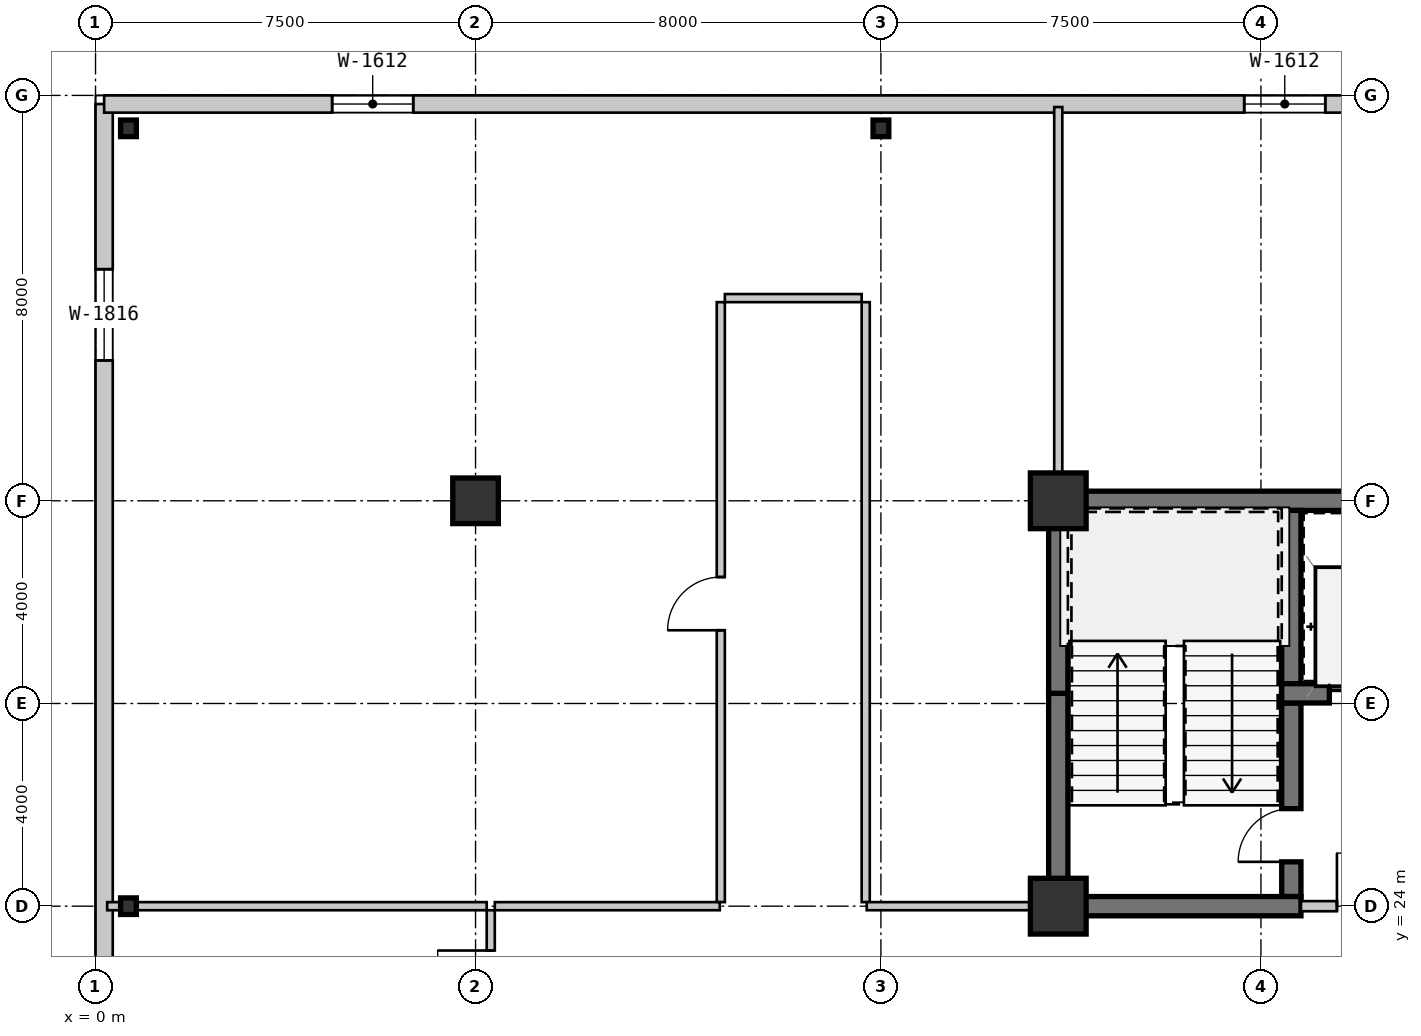
"""IFC4 building model, lengths in metres.
Left out: names, types, materials, properties, quantities, classifications, styles, units other than length and angle.
Written with IfcOpenShell. Run it as: python <this file> out.ifc"""

import sys

from ifc_helpers import new_model, si_unit, direction, frame, frame_2d, origin, origin_2d, place, context, subcontext, project, spatial, rectangle, circle, i_section, extrude, source, transform, mapped, element, fill, save


model = new_model("IFC4")
c1 = context("Model", 3, precision=1e-05, world=origin(), true_north=direction((0.0, 1.0)))
c2 = subcontext(c1, "Body", "Model", "MODEL_VIEW")
j1 = project(units=[si_unit("LENGTHUNIT", "METRE"), si_unit("PLANEANGLEUNIT", "RADIAN")], contexts=[c1])
p1 = place(None, origin())
s1 = spatial("IfcSite", under=j1, at=p1, CompositionType="ELEMENT")
p2 = place(p1, origin())
s2 = spatial("IfcBuilding", under=s1, at=p2, CompositionType="ELEMENT")
p3 = place(p2, frame((0.0, 0.0, 12.95)))
s3 = spatial("IfcBuildingStorey", under=s2, at=p3, CompositionType="ELEMENT", Elevation=12.95)
m1 = source(origin(), c2, "Body", "SweptSolid", [
    extrude(rectangle(XDim=1.1, YDim=1.1, at=origin_2d()), origin(), (0.0, 0.0, 1.0), 3.85),
])
for number, where, z_axis, x_axis in (
    (1, (19.0, 24.0, 0.0), (0.0, 0.0, 1.0), (1.0, 0.0, 0.0)),
    (2, (19.0, 32.0, 0.0), (0.0, 0.0, 1.0), (1.0, 0.0, 0.0)),
):
    element("IfcColumn", number, at=place(p3, frame(where, z_axis=z_axis, x_axis=x_axis)), inside=s3, PredefinedType="COLUMN", context=c2, shape_type="MappedRepresentation", body=[
        mapped(m1, transform((0.0, 0.0, 0.0), scale=1.0)),
    ])
m2 = source(origin(), c2, "Body", "SweptSolid", [
    extrude(circle(Radius=0.45, at=origin_2d()), origin(), (0.0, 0.0, 1.0), 3.85),
])
p4 = place(p3, frame((7.5, 32.0, 0.0), z_axis=(0.0, 0.0, 1.0), x_axis=(1.0, 0.0, 0.0)))
e3 = element("IfcColumn", 3, at=p4, inside=s3, PredefinedType="COLUMN", context=c2, shape_type="MappedRepresentation", body=[
    mapped(m2, transform((0.0, 0.0, 0.0), scale=1.0)),
])
m3 = source(origin(), c2, "Body", "SweptSolid", [
    extrude(i_section(OverallWidth=0.311, OverallDepth=0.327, WebThickness=0.016, FlangeThickness=0.025, at=origin_2d()), origin(), (0.0, 0.0, 1.0), 3.85),
])
for number, where, z_axis, x_axis in (
    (4, (0.65, 24.0, 0.0), (0.0, 0.0, 1.0), (1.0, 0.0, 0.0)),
    (5, (0.65, 39.35, 0.0), (0.0, 0.0, 1.0), (1.0, 0.0, 0.0)),
    (6, (15.5, 39.35, 0.0), (0.0, 0.0, 1.0), (1.0, 0.0, 0.0)),
):
    element("IfcColumn", number, at=place(p3, frame(where, z_axis=z_axis, x_axis=x_axis)), inside=s3, PredefinedType="COLUMN", context=c2, shape_type="MappedRepresentation", body=[
        mapped(m3, transform((0.0, 0.0, 0.0), scale=1.0)),
    ])
m4 = source(origin(), c2, "Body", "SweptSolid", [
    extrude(rectangle(XDim=39.66, YDim=0.34, at=frame_2d((19.83, 0.0))), origin(), (0.0, 0.0, 1.0), 3.43),
])
p5 = place(p3, frame((0.17, 0.17, 0.0), z_axis=(0.0, 0.0, 1.0), x_axis=(0.0, 1.0, 0.0)))
e7 = element("IfcWall", 7, at=p5, inside=s3, PredefinedType="SOLIDWALL", context=c2, shape_type="MappedRepresentation", body=[
    mapped(m4, transform((0.0, 0.0, 0.0), scale=1.0)),
])
m5 = source(origin(), c2, "Body", "SweptSolid", [
    extrude(rectangle(XDim=1.5, YDim=1.5, at=frame_2d((0.75, 0.75))), frame((0.0, 0.18, 0.0), z_axis=(0.0, -1.0, 0.0), x_axis=(1.0, 0.0, 0.0)), (0.0, 0.0, 1.0), 0.36),
])
p6 = place(p5, frame((3.2, 0.0, 0.55)))
e8 = element("IfcOpeningElement", 8, at=p6, cuts=e7, PredefinedType="OPENING", context=c2, shape_type="MappedRepresentation", body=[
    mapped(m5, transform((0.0, 0.0, 0.0), scale=1.0)),
])
m6 = source(origin(), c2, "Body", "SweptSolid", [
    extrude(rectangle(XDim=1.2, YDim=1.5, at=frame_2d((0.6, 0.75))), frame((0.0, 0.18, 0.0), z_axis=(0.0, -1.0, 0.0), x_axis=(1.0, 0.0, 0.0)), (0.0, 0.0, 1.0), 0.36),
])
p7 = place(p5, frame((7.8, 0.0, 0.55)))
e9 = element("IfcOpeningElement", 9, at=p7, cuts=e7, PredefinedType="OPENING", context=c2, shape_type="MappedRepresentation", body=[
    mapped(m6, transform((0.0, 0.0, 0.0), scale=1.0)),
])
m7 = source(origin(), c2, "Body", "SweptSolid", [
    extrude(rectangle(XDim=2.4, YDim=1.8, at=frame_2d((1.2, 0.9))), frame((0.0, 0.18, 0.0), z_axis=(0.0, -1.0, 0.0), x_axis=(1.0, 0.0, 0.0)), (0.0, 0.0, 1.0), 0.36),
])
p8 = place(p5, frame((19.8, 0.0, 0.55)))
e10 = element("IfcOpeningElement", 10, at=p8, cuts=e7, PredefinedType="OPENING", context=c2, shape_type="MappedRepresentation", body=[
    mapped(m7, transform((0.0, 0.0, 0.0), scale=1.0)),
])
m8 = source(origin(), c2, "Body", "SweptSolid", [
    extrude(rectangle(XDim=1.8, YDim=1.6, at=frame_2d((0.9, 0.8))), frame((0.0, 0.18, 0.0), z_axis=(0.0, -1.0, 0.0), x_axis=(1.0, 0.0, 0.0)), (0.0, 0.0, 1.0), 0.36),
])
p9 = place(p5, frame((34.6, 0.0, 0.55)))
e11 = element("IfcOpeningElement", 11, at=p9, cuts=e7, PredefinedType="OPENING", context=c2, shape_type="MappedRepresentation", body=[
    mapped(m8, transform((0.0, 0.0, 0.0), scale=1.0)),
])
m9 = source(origin(), c2, "Body", "SweptSolid", [
    extrude(rectangle(XDim=69.66, YDim=0.34, at=frame_2d((34.83, 0.0))), origin(), (0.0, 0.0, 1.0), 3.43),
])
p10 = place(p3, frame((0.17, 39.83, 0.0), z_axis=(0.0, 0.0, 1.0), x_axis=(1.0, 0.0, 0.0)))
e12 = element("IfcWall", 12, at=p10, inside=s3, PredefinedType="SOLIDWALL", context=c2, shape_type="MappedRepresentation", body=[
    mapped(m9, transform((0.0, 0.0, 0.0), scale=1.0)),
])
m10 = source(origin(), c2, "Body", "SweptSolid", [
    extrude(rectangle(XDim=1.6, YDim=1.2, at=frame_2d((0.8, 0.6))), frame((0.0, 0.18, 0.0), z_axis=(0.0, -1.0, 0.0), x_axis=(1.0, 0.0, 0.0)), (0.0, 0.0, 1.0), 0.36),
])
p11 = place(p10, frame((4.5, 0.0, 0.55)))
e13 = element("IfcOpeningElement", 13, at=p11, cuts=e12, PredefinedType="OPENING", context=c2, shape_type="MappedRepresentation", body=[
    mapped(m10, transform((0.0, 0.0, 0.0), scale=1.0)),
])
p12 = place(p10, frame((22.5, 0.0, 0.55)))
e14 = element("IfcOpeningElement", 14, at=p12, cuts=e12, PredefinedType="OPENING", context=c2, shape_type="MappedRepresentation", body=[
    mapped(m10, transform((0.0, 0.0, 0.0), scale=1.0)),
])
p13 = place(p10, frame((29.0, 0.0, 0.55)))
e15 = element("IfcOpeningElement", 15, at=p13, cuts=e12, PredefinedType="OPENING", context=c2, shape_type="MappedRepresentation", body=[
    mapped(m10, transform((0.0, 0.0, 0.0), scale=1.0)),
])
p14 = place(p10, frame((40.5, 0.0, 0.55)))
e16 = element("IfcOpeningElement", 16, at=p14, cuts=e12, PredefinedType="OPENING", context=c2, shape_type="MappedRepresentation", body=[
    mapped(m10, transform((0.0, 0.0, 0.0), scale=1.0)),
])
p15 = place(p10, frame((46.5, 0.0, 0.55)))
e17 = element("IfcOpeningElement", 17, at=p15, cuts=e12, PredefinedType="OPENING", context=c2, shape_type="MappedRepresentation", body=[
    mapped(m10, transform((0.0, 0.0, 0.0), scale=1.0)),
])
p16 = place(p10, frame((62.5, 0.0, 0.55)))
e18 = element("IfcOpeningElement", 18, at=p16, cuts=e12, PredefinedType="OPENING", context=c2, shape_type="MappedRepresentation", body=[
    mapped(m10, transform((0.0, 0.0, 0.0), scale=1.0)),
])
m11 = source(origin(), c2, "Body", "SweptSolid", [
    extrude(rectangle(XDim=9.19, YDim=0.38, at=frame_2d((4.595, 0.0))), origin(), (0.0, 0.0, 1.0), 3.43),
])
p17 = place(p3, frame((18.81, 32.0, 0.0), z_axis=(0.0, 0.0, 1.0), x_axis=(1.0, 0.0, 0.0)))
e19 = element("IfcWall", 19, at=p17, inside=s3, PredefinedType="SHEAR", context=c2, shape_type="MappedRepresentation", body=[
    mapped(m11, transform((0.0, 0.0, 0.0), scale=1.0)),
])
m12 = source(origin(), c2, "Body", "SweptSolid", [
    extrude(rectangle(XDim=4.01, YDim=0.38, at=frame_2d((2.005, 0.0))), origin(), (0.0, 0.0, 1.0), 3.43),
])
p18 = place(p3, frame((19.0, 24.19, 0.0), z_axis=(0.0, 0.0, 1.0), x_axis=(0.0, 1.0, 0.0)))
e20 = element("IfcWall", 20, at=p18, inside=s3, PredefinedType="SHEAR", context=c2, shape_type="MappedRepresentation", body=[
    mapped(m12, transform((0.0, 0.0, 0.0), scale=1.0)),
])
m13 = source(origin(), c2, "Body", "SweptSolid", [
    extrude(rectangle(XDim=3.61, YDim=0.38, at=frame_2d((1.805, 0.0))), origin(), (0.0, 0.0, 1.0), 3.43),
])
p19 = place(p3, frame((19.0, 28.2, 0.0), z_axis=(0.0, 0.0, 1.0), x_axis=(0.0, 1.0, 0.0)))
e21 = element("IfcWall", 21, at=p19, inside=s3, PredefinedType="SHEAR", context=c2, shape_type="MappedRepresentation", body=[
    mapped(m13, transform((0.0, 0.0, 0.0), scale=1.0)),
])
m14 = source(origin(), c2, "Body", "SweptSolid", [
    extrude(rectangle(XDim=3.42, YDim=0.38, at=frame_2d((1.71, 0.0))), origin(), (0.0, 0.0, 1.0), 3.43),
])
p20 = place(p3, frame((23.6, 28.39, 0.0), z_axis=(0.0, 0.0, 1.0), x_axis=(0.0, 1.0, 0.0)))
e22 = element("IfcWall", 22, at=p20, inside=s3, PredefinedType="SHEAR", context=c2, shape_type="MappedRepresentation", body=[
    mapped(m14, transform((0.0, 0.0, 0.0), scale=1.0)),
])
m15 = source(origin(), c2, "Body", "SweptSolid", [
    extrude(rectangle(XDim=3.82, YDim=0.38, at=frame_2d((1.91, 0.0))), origin(), (0.0, 0.0, 1.0), 3.43),
])
p21 = place(p3, frame((23.6, 24.19, 0.0), z_axis=(0.0, 0.0, 1.0), x_axis=(0.0, 1.0, 0.0)))
e23 = element("IfcWall", 23, at=p21, inside=s3, PredefinedType="SHEAR", context=c2, shape_type="MappedRepresentation", body=[
    mapped(m15, transform((0.0, 0.0, 0.0), scale=1.0)),
])
m16 = source(origin(), c2, "Body", "SweptSolid", [
    extrude(rectangle(XDim=1.05, YDim=2.1, at=frame_2d((0.525, 1.05))), frame((0.0, 0.2, 0.0), z_axis=(0.0, -1.0, 0.0), x_axis=(1.0, 0.0, 0.0)), (0.0, 0.0, 1.0), 0.4),
])
p22 = place(p21, frame((0.685, 0.0, 0.0)))
e24 = element("IfcOpeningElement", 24, at=p22, cuts=e23, PredefinedType="OPENING", context=c2, shape_type="MappedRepresentation", body=[
    mapped(m16, transform((0.0, 0.0, 0.0), scale=1.0)),
])
m17 = source(origin(), c2, "Body", "SweptSolid", [
    extrude(rectangle(XDim=4.98, YDim=0.38, at=frame_2d((2.49, 0.0))), origin(), (0.0, 0.0, 1.0), 3.43),
])
p23 = place(p3, frame((18.81, 24.0, 0.0), z_axis=(0.0, 0.0, 1.0), x_axis=(1.0, 0.0, 0.0)))
e25 = element("IfcWall", 25, at=p23, inside=s3, PredefinedType="SHEAR", context=c2, shape_type="MappedRepresentation", body=[
    mapped(m17, transform((0.0, 0.0, 0.0), scale=1.0)),
])
m18 = source(origin(), c2, "Body", "SweptSolid", [
    extrude(rectangle(XDim=2.98, YDim=0.38, at=frame_2d((1.49, 0.0))), origin(), (0.0, 0.0, 1.0), 3.43),
])
p24 = place(p3, frame((23.41, 28.2, 0.0), z_axis=(0.0, 0.0, 1.0), x_axis=(1.0, 0.0, 0.0)))
e26 = element("IfcWall", 26, at=p24, inside=s3, PredefinedType="SHEAR", context=c2, shape_type="MappedRepresentation", body=[
    mapped(m18, transform((0.0, 0.0, 0.0), scale=1.0)),
])
m19 = source(origin(), c2, "Body", "SweptSolid", [
    extrude(rectangle(XDim=1.1, YDim=2.15, at=frame_2d((0.55, 1.075))), frame((0.0, 0.2, 0.0), z_axis=(0.0, -1.0, 0.0), x_axis=(1.0, 0.0, 0.0)), (0.0, 0.0, 1.0), 0.4),
])
p25 = place(p24, frame((0.94, 0.0, 0.0)))
e27 = element("IfcOpeningElement", 27, at=p25, cuts=e26, PredefinedType="OPENING", context=c2, shape_type="MappedRepresentation", body=[
    mapped(m19, transform((0.0, 0.0, 0.0), scale=1.0)),
])
m20 = source(origin(), c2, "Body", "SweptSolid", [
    extrude(rectangle(XDim=2.66, YDim=0.2, at=frame_2d((1.33, 0.0))), origin(), (0.0, 0.0, 1.0), 2.97),
])
p26 = place(p3, frame((23.79, 24.0, 0.0), z_axis=(0.0, 0.0, 1.0), x_axis=(1.0, 0.0, 0.0)))
e28 = element("IfcWall", 28, at=p26, inside=s3, PredefinedType="SOLIDWALL", context=c2, shape_type="MappedRepresentation", body=[
    mapped(m20, transform((0.0, 0.0, 0.0), scale=1.0)),
])
m21 = source(origin(), c2, "Body", "SweptSolid", [
    extrude(rectangle(XDim=1.05, YDim=2.1, at=frame_2d((0.525, 1.05))), frame((0.0, 0.11, 0.0), z_axis=(0.0, -1.0, 0.0), x_axis=(1.0, 0.0, 0.0)), (0.0, 0.0, 1.0), 0.22),
])
p27 = place(p26, frame((0.71, 0.0, 0.0)))
e29 = element("IfcOpeningElement", 29, at=p27, cuts=e28, PredefinedType="OPENING", context=c2, shape_type="MappedRepresentation", body=[
    mapped(m21, transform((0.0, 0.0, 0.0), scale=1.0)),
])
m22 = source(origin(), c2, "Body", "SweptSolid", [
    extrude(rectangle(XDim=2.64, YDim=0.16, at=frame_2d((1.32, 0.0))), origin(), (0.0, 0.0, 1.0), 3.43),
])
p28 = place(p3, frame((7.8, 21.28, 0.0), z_axis=(0.0, 0.0, 1.0), x_axis=(0.0, 1.0, 0.0)))
e30 = element("IfcWall", 30, at=p28, inside=s3, PredefinedType="PARTITIONING", context=c2, shape_type="MappedRepresentation", body=[
    mapped(m22, transform((0.0, 0.0, 0.0), scale=1.0)),
])
m23 = source(origin(), c2, "Body", "SweptSolid", [
    extrude(rectangle(XDim=1.05, YDim=2.1, at=frame_2d((0.525, 1.05))), frame((0.0, 0.09, 0.0), z_axis=(0.0, -1.0, 0.0), x_axis=(1.0, 0.0, 0.0)), (0.0, 0.0, 1.0), 0.18),
])
p29 = place(p28, frame((0.795, 0.0, 0.0)))
e31 = element("IfcOpeningElement", 31, at=p29, cuts=e30, PredefinedType="OPENING", context=c2, shape_type="MappedRepresentation", body=[
    mapped(m23, transform((0.0, 0.0, 0.0), scale=1.0)),
])
m24 = source(origin(), c2, "Body", "SweptSolid", [
    extrude(rectangle(XDim=11.84, YDim=0.16, at=frame_2d((5.92, 0.0))), origin(), (0.0, 0.0, 1.0), 3.43),
])
p30 = place(p3, frame((12.34, 24.08, 0.0), z_axis=(0.0, 0.0, 1.0), x_axis=(0.0, 1.0, 0.0)))
e32 = element("IfcWall", 32, at=p30, inside=s3, PredefinedType="PARTITIONING", context=c2, shape_type="MappedRepresentation", body=[
    mapped(m24, transform((0.0, 0.0, 0.0), scale=1.0)),
])
p31 = place(p30, frame((5.365, 0.0, 0.0)))
e33 = element("IfcOpeningElement", 33, at=p31, cuts=e32, PredefinedType="OPENING", context=c2, shape_type="MappedRepresentation", body=[
    mapped(m23, transform((0.0, 0.0, 0.0), scale=1.0)),
])
p32 = place(p3, frame((15.2, 35.92, 0.0), z_axis=(0.0, 0.0, 1.0), x_axis=(0.0, -1.0, 0.0)))
e34 = element("IfcWall", 34, at=p32, inside=s3, PredefinedType="PARTITIONING", context=c2, shape_type="MappedRepresentation", body=[
    mapped(m24, transform((0.0, 0.0, 0.0), scale=1.0)),
])
m25 = source(origin(), c2, "Body", "SweptSolid", [
    extrude(rectangle(XDim=4.44, YDim=0.16, at=frame_2d((2.22, 0.0))), origin(), (0.0, 0.0, 1.0), 3.43),
])
p33 = place(p3, frame((7.88, 24.0, 0.0), z_axis=(0.0, 0.0, 1.0), x_axis=(1.0, 0.0, 0.0)))
e35 = element("IfcWall", 35, at=p33, inside=s3, PredefinedType="PARTITIONING", context=c2, shape_type="MappedRepresentation", body=[
    mapped(m25, transform((0.0, 0.0, 0.0), scale=1.0)),
])
m26 = source(origin(), c2, "Body", "SweptSolid", [
    extrude(rectangle(XDim=3.59, YDim=0.16, at=frame_2d((1.795, 0.0))), origin(), (0.0, 0.0, 1.0), 3.43),
])
p34 = place(p3, frame((15.22, 24.0, 0.0), z_axis=(0.0, 0.0, 1.0), x_axis=(1.0, 0.0, 0.0)))
e36 = element("IfcWall", 36, at=p34, inside=s3, PredefinedType="PARTITIONING", context=c2, shape_type="MappedRepresentation", body=[
    mapped(m26, transform((0.0, 0.0, 0.0), scale=1.0)),
])
m27 = source(origin(), c2, "Body", "SweptSolid", [
    extrude(rectangle(XDim=2.7, YDim=0.16, at=frame_2d((1.35, 0.0))), origin(), (0.0, 0.0, 1.0), 3.43),
])
p35 = place(p3, frame((12.42, 36.0, 0.0), z_axis=(0.0, 0.0, 1.0), x_axis=(1.0, 0.0, 0.0)))
e37 = element("IfcWall", 37, at=p35, inside=s3, PredefinedType="PARTITIONING", context=c2, shape_type="MappedRepresentation", body=[
    mapped(m27, transform((0.0, 0.0, 0.0), scale=1.0)),
])
m28 = source(origin(), c2, "Body", "SweptSolid", [
    extrude(rectangle(XDim=7.49, YDim=0.16, at=frame_2d((3.745, 0.0))), origin(), (0.0, 0.0, 1.0), 3.43),
])
p36 = place(p3, frame((0.23, 24.0, 0.0), z_axis=(0.0, 0.0, 1.0), x_axis=(1.0, 0.0, 0.0)))
e38 = element("IfcWall", 38, at=p36, inside=s3, PredefinedType="PARTITIONING", context=c2, shape_type="MappedRepresentation", body=[
    mapped(m28, transform((0.0, 0.0, 0.0), scale=1.0)),
])
m29 = source(origin(), c2, "Body", "SweptSolid", [
    extrude(rectangle(XDim=7.58, YDim=0.16, at=frame_2d((3.79, 0.0))), origin(), (0.0, 0.0, 1.0), 3.43),
])
p37 = place(p3, frame((19.0, 39.77, 0.0), z_axis=(0.0, 0.0, 1.0), x_axis=(0.0, -1.0, 0.0)))
e39 = element("IfcWall", 39, at=p37, inside=s3, PredefinedType="PARTITIONING", context=c2, shape_type="MappedRepresentation", body=[
    mapped(m29, transform((0.0, 0.0, 0.0), scale=1.0)),
])
m30 = source(origin(), c2, "Body", "SweptSolid", [
    extrude(rectangle(XDim=1.8, YDim=1.6, at=frame_2d((0.9, 0.8))), frame((0.0, 0.03, 0.0), z_axis=(0.0, -1.0, 0.0), x_axis=(1.0, 0.0, 0.0)), (0.0, 0.0, 1.0), 0.06),
])
p38 = place(p9, origin())
e40 = element("IfcWindow", 40, at=p38, inside=s3, PartitioningType="SINGLE_PANEL", PredefinedType="WINDOW", context=c2, shape_type="MappedRepresentation", body=[
    mapped(m30, transform((0.0, 0.0, 0.0), scale=1.0)),
])
fill(e11, e40)
m31 = source(origin(), c2, "Body", "SweptSolid", [
    extrude(rectangle(XDim=1.6, YDim=1.2, at=frame_2d((0.8, 0.6))), frame((0.0, 0.03, 0.0), z_axis=(0.0, -1.0, 0.0), x_axis=(1.0, 0.0, 0.0)), (0.0, 0.0, 1.0), 0.06),
])
p39 = place(p11, origin())
e41 = element("IfcWindow", 41, at=p39, inside=s3, PartitioningType="SINGLE_PANEL", PredefinedType="WINDOW", context=c2, shape_type="MappedRepresentation", body=[
    mapped(m31, transform((0.0, 0.0, 0.0), scale=1.0)),
])
fill(e13, e41)
p40 = place(p12, origin())
e42 = element("IfcWindow", 42, at=p40, inside=s3, PartitioningType="SINGLE_PANEL", PredefinedType="WINDOW", context=c2, shape_type="MappedRepresentation", body=[
    mapped(m31, transform((0.0, 0.0, 0.0), scale=1.0)),
])
fill(e14, e42)
m32 = source(origin(), c2, "Body", "SweptSolid", [
    extrude(rectangle(XDim=1.05, YDim=2.1, at=frame_2d((0.525, 1.05))), frame((0.0, 0.025, 0.0), z_axis=(0.0, -1.0, 0.0), x_axis=(1.0, 0.0, 0.0)), (0.0, 0.0, 1.0), 0.05),
])
p41 = place(p22, origin())
e43 = element("IfcDoor", 43, at=p41, inside=s3, OperationType="SINGLE_SWING_LEFT", PredefinedType="DOOR", context=c2, shape_type="MappedRepresentation", body=[
    mapped(m32, transform((0.0, 0.0, 0.0), scale=1.0)),
])
fill(e24, e43)
m33 = source(origin(), c2, "Body", "SweptSolid", [
    extrude(rectangle(XDim=1.1, YDim=2.15, at=frame_2d((0.55, 1.075))), frame((0.0, 0.025, 0.0), z_axis=(0.0, -1.0, 0.0), x_axis=(1.0, 0.0, 0.0)), (0.0, 0.0, 1.0), 0.05),
])
p42 = place(p25, origin())
e44 = element("IfcDoor", 44, at=p42, inside=s3, OperationType="SLIDING_TO_LEFT", PredefinedType="DOOR", context=c2, shape_type="MappedRepresentation", body=[
    mapped(m33, transform((0.0, 0.0, 0.0), scale=1.0)),
])
fill(e27, e44)
p43 = place(p27, origin())
e45 = element("IfcDoor", 45, at=p43, inside=s3, OperationType="SINGLE_SWING_LEFT", PredefinedType="DOOR", context=c2, shape_type="MappedRepresentation", body=[
    mapped(m32, transform((0.0, 0.0, 0.0), scale=1.0)),
])
fill(e29, e45)
p44 = place(p29, origin())
e46 = element("IfcDoor", 46, at=p44, inside=s3, OperationType="SINGLE_SWING_RIGHT", PredefinedType="DOOR", context=c2, shape_type="MappedRepresentation", body=[
    mapped(m32, transform((0.0, 0.0, 0.0), scale=1.0)),
])
fill(e31, e46)
p45 = place(p31, origin())
e47 = element("IfcDoor", 47, at=p45, inside=s3, OperationType="SINGLE_SWING_LEFT", PredefinedType="DOOR", context=c2, shape_type="MappedRepresentation", body=[
    mapped(m32, transform((0.0, 0.0, 0.0), scale=1.0)),
])
fill(e33, e47)
save(model, sys.argv[1])
